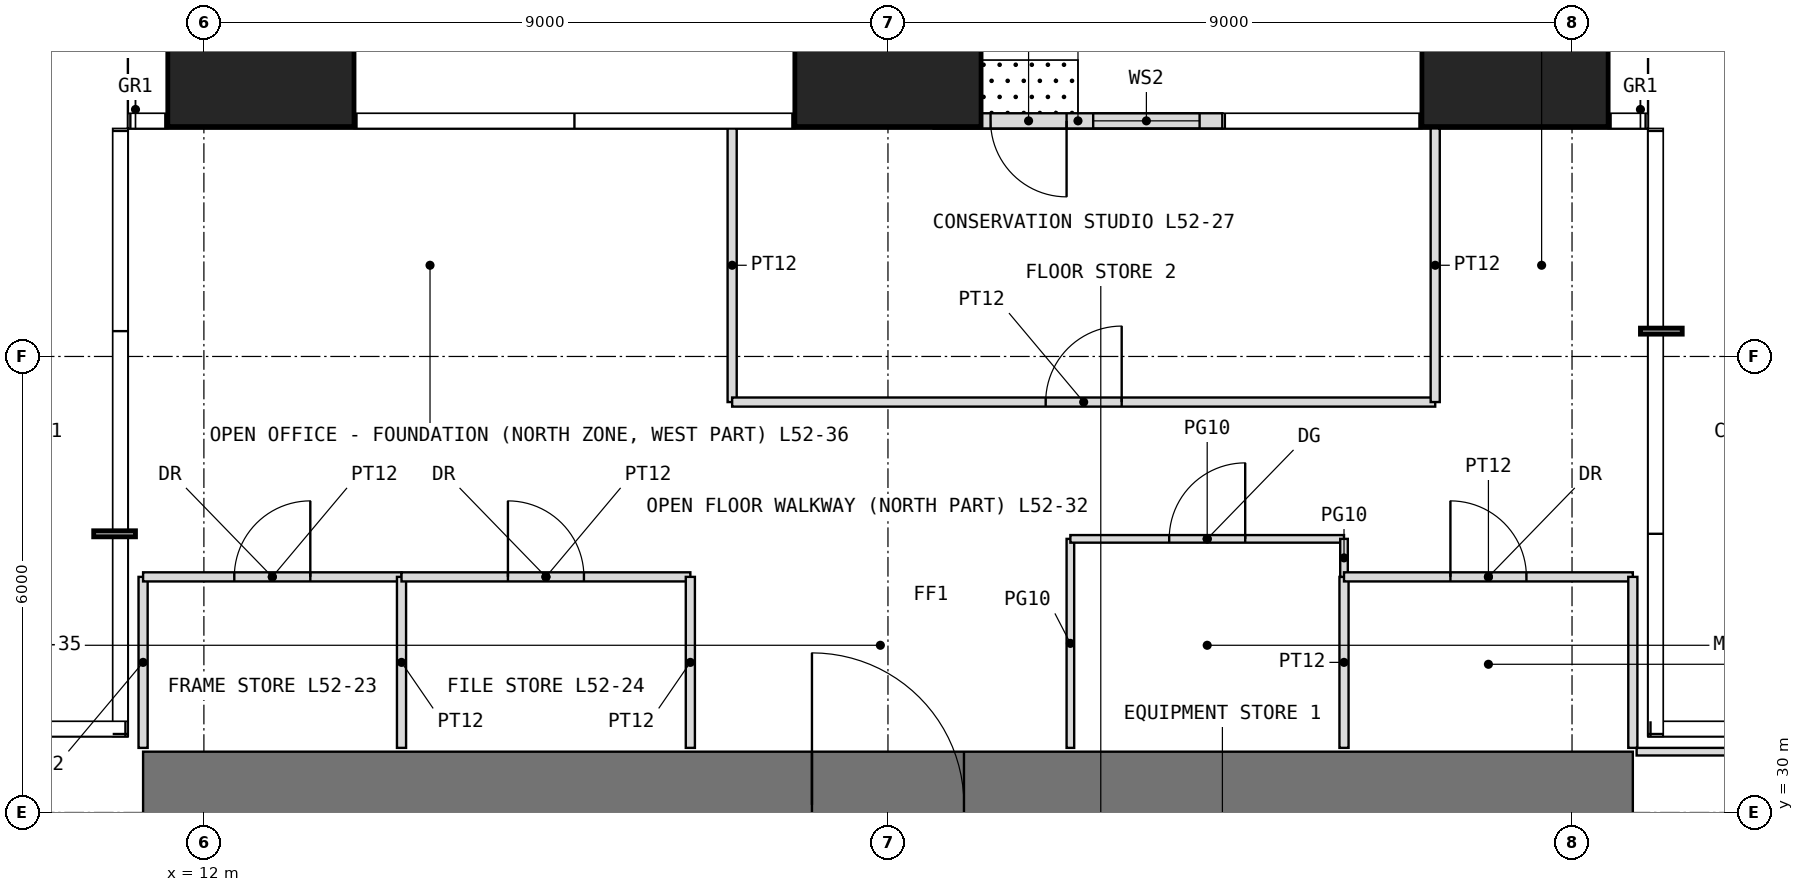
"""IFC4 building model, lengths in metres.
Left out: names, types, materials, properties, quantities, classifications, styles, units other than length and angle.
Written with IfcOpenShell. Run it as: python <this file> out.ifc"""

import sys

from ifc_helpers import new_model, si_unit, direction, frame, frame_2d, origin, origin_2d, place, context, subcontext, project, spatial, rectangle, extrude, element, fill, save


model = new_model("IFC4")
c1 = context("Model", 3, precision=1e-05, world=origin(), true_north=direction((0.0, 1.0)))
c2 = subcontext(c1, "Body", "Model", "MODEL_VIEW")
j1 = project(units=[si_unit("LENGTHUNIT", "METRE"), si_unit("PLANEANGLEUNIT", "RADIAN")], contexts=[c1])
p1 = place(None, origin())
s1 = spatial("IfcSite", under=j1, at=p1, CompositionType="ELEMENT")
p2 = place(p1, origin())
s2 = spatial("IfcBuilding", under=s1, at=p2, CompositionType="ELEMENT")
p3 = place(p2, frame((0.0, 0.0, 218.5)))
s3 = spatial("IfcBuildingStorey", under=s2, at=p3, CompositionType="ELEMENT", Elevation=218.5)
for number, where, z_axis, x_axis in (
    (1, (12.75, 40.25, 0.0), (0.0, 0.0, 1.0), (1.0, 0.0, 0.0)),
    (2, (21.0, 40.25, 0.0), (0.0, 0.0, 1.0), (1.0, 0.0, 0.0)),
    (3, (29.25, 40.25, 0.0), (0.0, 0.0, 1.0), (1.0, 0.0, 0.0)),
):
    element("IfcColumn", number, at=place(p3, frame(where, z_axis=z_axis, x_axis=x_axis)), inside=s3, PredefinedType="COLUMN", context=c2, shape_type="SweptSolid", body=[
        extrude(rectangle(XDim=2.45, YDim=2.45, at=origin_2d()), origin(), (0.0, 0.0, 1.0), 4.0),
    ])
p4 = place(p3, frame((25.4, 39.1, 0.0), z_axis=(0.0, 0.0, 1.0), x_axis=(-1.0, 0.0, 0.0)))
e4 = element("IfcWall", 4, at=p4, inside=s3, PredefinedType="USERDEFINED", context=c2, shape_type="SweptSolid", body=[
    extrude(rectangle(XDim=3.8, YDim=0.2, at=frame_2d((1.9, 0.0))), origin(), (0.0, 0.0, 1.0), 3.75),
])
p5 = place(p4, frame((2.05, 0.0, 0.0)))
e5 = element("IfcOpeningElement", 5, at=p5, cuts=e4, PredefinedType="OPENING", context=c2, shape_type="SweptSolid", body=[
    extrude(rectangle(XDim=1.0, YDim=2.4, at=frame_2d((0.5, 1.2))), frame((0.0, 0.11, 0.0), z_axis=(0.0, -1.0, 0.0), x_axis=(1.0, 0.0, 0.0)), (0.0, 0.0, 1.0), 0.22),
])
p6 = place(p4, frame((0.3, 0.0, 0.3)))
e6 = element("IfcOpeningElement", 6, at=p6, cuts=e4, PredefinedType="OPENING", context=c2, shape_type="SweptSolid", body=[
    extrude(rectangle(XDim=1.4, YDim=2.7, at=frame_2d((0.7, 1.35))), frame((0.0, 0.11, 0.0), z_axis=(0.0, -1.0, 0.0), x_axis=(1.0, 0.0, 0.0)), (0.0, 0.0, 1.0), 0.22),
])
p7 = place(p3, frame((11.2, 30.1, -0.05), z_axis=(0.0, 0.0, 1.0), x_axis=(1.0, 0.0, 0.0)))
e7 = element("IfcWall", 7, at=p7, inside=s3, PredefinedType="SHEAR", context=c2, shape_type="SweptSolid", body=[
    extrude(rectangle(XDim=19.6, YDim=1.4, at=frame_2d((9.8, 0.0))), origin(), (0.0, 0.0, 1.0), 4.0),
])
p8 = place(p7, frame((8.8, 0.0, 0.05)))
e8 = element("IfcOpeningElement", 8, at=p8, cuts=e7, PredefinedType="OPENING", context=c2, shape_type="SweptSolid", body=[
    extrude(rectangle(XDim=2.0, YDim=2.2, at=frame_2d((1.0, 1.1))), frame((0.0, 0.71, 0.0), z_axis=(0.0, -1.0, 0.0), x_axis=(1.0, 0.0, 0.0)), (0.0, 0.0, 1.0), 1.42),
])
p9 = place(p3, frame((11.2, 30.85, 0.0), z_axis=(0.0, 0.0, 1.0), x_axis=(0.0, 1.0, 0.0)))
e9 = element("IfcWall", 9, at=p9, inside=s3, PredefinedType="PARTITIONING", context=c2, shape_type="SweptSolid", body=[
    extrude(rectangle(XDim=2.25, YDim=0.12, at=frame_2d((1.125, 0.0))), origin(), (0.0, 0.0, 1.0), 3.75),
])
p10 = place(p3, frame((11.2, 33.1, 0.0), z_axis=(0.0, 0.0, 1.0), x_axis=(1.0, 0.0, 0.0)))
e10 = element("IfcWall", 10, at=p10, inside=s3, PredefinedType="PARTITIONING", context=c2, shape_type="SweptSolid", body=[
    extrude(rectangle(XDim=3.4, YDim=0.12, at=frame_2d((1.7, 0.0))), origin(), (0.0, 0.0, 1.0), 3.75),
])
p11 = place(p10, frame((1.2, 0.0, 0.0)))
e11 = element("IfcOpeningElement", 11, at=p11, cuts=e10, PredefinedType="OPENING", context=c2, shape_type="SweptSolid", body=[
    extrude(rectangle(XDim=1.0, YDim=2.2, at=frame_2d((0.5, 1.1))), frame((0.0, 0.07, 0.0), z_axis=(0.0, -1.0, 0.0), x_axis=(1.0, 0.0, 0.0)), (0.0, 0.0, 1.0), 0.14),
])
p12 = place(p3, frame((14.6, 30.85, 0.0), z_axis=(0.0, 0.0, 1.0), x_axis=(0.0, 1.0, 0.0)))
e12 = element("IfcWall", 12, at=p12, inside=s3, PredefinedType="PARTITIONING", context=c2, shape_type="SweptSolid", body=[
    extrude(rectangle(XDim=2.25, YDim=0.12, at=frame_2d((1.125, 0.0))), origin(), (0.0, 0.0, 1.0), 3.75),
])
p13 = place(p3, frame((14.6, 33.1, 0.0), z_axis=(0.0, 0.0, 1.0), x_axis=(1.0, 0.0, 0.0)))
e13 = element("IfcWall", 13, at=p13, inside=s3, PredefinedType="PARTITIONING", context=c2, shape_type="SweptSolid", body=[
    extrude(rectangle(XDim=3.8, YDim=0.12, at=frame_2d((1.9, 0.0))), origin(), (0.0, 0.0, 1.0), 3.75),
])
p14 = place(p13, frame((1.4, 0.0, 0.0)))
e14 = element("IfcOpeningElement", 14, at=p14, cuts=e13, PredefinedType="OPENING", context=c2, shape_type="SweptSolid", body=[
    extrude(rectangle(XDim=1.0, YDim=2.2, at=frame_2d((0.5, 1.1))), frame((0.0, 0.07, 0.0), z_axis=(0.0, -1.0, 0.0), x_axis=(1.0, 0.0, 0.0)), (0.0, 0.0, 1.0), 0.14),
])
p15 = place(p3, frame((18.4, 30.85, 0.0), z_axis=(0.0, 0.0, 1.0), x_axis=(0.0, 1.0, 0.0)))
e15 = element("IfcWall", 15, at=p15, inside=s3, PredefinedType="PARTITIONING", context=c2, shape_type="SweptSolid", body=[
    extrude(rectangle(XDim=2.25, YDim=0.12, at=frame_2d((1.125, 0.0))), origin(), (0.0, 0.0, 1.0), 3.75),
])
p16 = place(p3, frame((18.95, 35.4, 0.0), z_axis=(0.0, 0.0, 1.0), x_axis=(0.0, 1.0, 0.0)))
e16 = element("IfcWall", 16, at=p16, inside=s3, PredefinedType="PARTITIONING", context=c2, shape_type="SweptSolid", body=[
    extrude(rectangle(XDim=3.6, YDim=0.12, at=frame_2d((1.8, 0.0))), origin(), (0.0, 0.0, 1.0), 3.75),
])
p17 = place(p3, frame((18.95, 35.4, 0.0), z_axis=(0.0, 0.0, 1.0), x_axis=(1.0, 0.0, 0.0)))
e17 = element("IfcWall", 17, at=p17, inside=s3, PredefinedType="PARTITIONING", context=c2, shape_type="SweptSolid", body=[
    extrude(rectangle(XDim=9.25, YDim=0.12, at=frame_2d((4.625, 0.0))), origin(), (0.0, 0.0, 1.0), 3.75),
])
p18 = place(p17, frame((4.125, 0.0, 0.0)))
e18 = element("IfcOpeningElement", 18, at=p18, cuts=e17, PredefinedType="OPENING", context=c2, shape_type="SweptSolid", body=[
    extrude(rectangle(XDim=1.0, YDim=2.2, at=frame_2d((0.5, 1.1))), frame((0.0, 0.07, 0.0), z_axis=(0.0, -1.0, 0.0), x_axis=(1.0, 0.0, 0.0)), (0.0, 0.0, 1.0), 0.14),
])
p19 = place(p3, frame((23.4, 30.85, 0.0), z_axis=(0.0, 0.0, 1.0), x_axis=(0.0, 1.0, 0.0)))
e19 = element("IfcWall", 19, at=p19, inside=s3, PredefinedType="PARTITIONING", context=c2, shape_type="SweptSolid", body=[
    extrude(rectangle(XDim=2.75, YDim=0.1, at=frame_2d((1.375, 0.0))), origin(), (0.0, 0.0, 1.0), 3.75),
])
p20 = place(p3, frame((23.4, 33.6, 0.0), z_axis=(0.0, 0.0, 1.0), x_axis=(1.0, 0.0, 0.0)))
e20 = element("IfcWall", 20, at=p20, inside=s3, PredefinedType="PARTITIONING", context=c2, shape_type="SweptSolid", body=[
    extrude(rectangle(XDim=3.6, YDim=0.1, at=frame_2d((1.8, 0.0))), origin(), (0.0, 0.0, 1.0), 3.75),
])
p21 = place(p20, frame((1.3, 0.0, 0.0)))
e21 = element("IfcOpeningElement", 21, at=p21, cuts=e20, PredefinedType="OPENING", context=c2, shape_type="SweptSolid", body=[
    extrude(rectangle(XDim=1.0, YDim=2.4, at=frame_2d((0.5, 1.2))), frame((0.0, 0.06, 0.0), z_axis=(0.0, -1.0, 0.0), x_axis=(1.0, 0.0, 0.0)), (0.0, 0.0, 1.0), 0.12),
])
p22 = place(p3, frame((27.0, 30.85, 0.0), z_axis=(0.0, 0.0, 1.0), x_axis=(0.0, 1.0, 0.0)))
e22 = element("IfcWall", 22, at=p22, inside=s3, PredefinedType="PARTITIONING", context=c2, shape_type="SweptSolid", body=[
    extrude(rectangle(XDim=2.25, YDim=0.12, at=frame_2d((1.125, 0.0))), origin(), (0.0, 0.0, 1.0), 3.75),
])
p23 = place(p3, frame((27.0, 33.1, 0.0), z_axis=(0.0, 0.0, 1.0), x_axis=(0.0, 1.0, 0.0)))
e23 = element("IfcWall", 23, at=p23, inside=s3, PredefinedType="PARTITIONING", context=c2, shape_type="SweptSolid", body=[
    extrude(rectangle(XDim=0.5, YDim=0.1, at=frame_2d((0.25, 0.0))), origin(), (0.0, 0.0, 1.0), 3.75),
])
p24 = place(p3, frame((27.0, 33.1, 0.0), z_axis=(0.0, 0.0, 1.0), x_axis=(1.0, 0.0, 0.0)))
e24 = element("IfcWall", 24, at=p24, inside=s3, PredefinedType="PARTITIONING", context=c2, shape_type="SweptSolid", body=[
    extrude(rectangle(XDim=3.8, YDim=0.12, at=frame_2d((1.9, 0.0))), origin(), (0.0, 0.0, 1.0), 3.75),
])
p25 = place(p24, frame((1.4, 0.0, 0.0)))
e25 = element("IfcOpeningElement", 25, at=p25, cuts=e24, PredefinedType="OPENING", context=c2, shape_type="SweptSolid", body=[
    extrude(rectangle(XDim=1.0, YDim=2.2, at=frame_2d((0.5, 1.1))), frame((0.0, 0.07, 0.0), z_axis=(0.0, -1.0, 0.0), x_axis=(1.0, 0.0, 0.0)), (0.0, 0.0, 1.0), 0.14),
])
p26 = place(p3, frame((28.2, 35.4, 0.0), z_axis=(0.0, 0.0, 1.0), x_axis=(0.0, 1.0, 0.0)))
e26 = element("IfcWall", 26, at=p26, inside=s3, PredefinedType="PARTITIONING", context=c2, shape_type="SweptSolid", body=[
    extrude(rectangle(XDim=3.6, YDim=0.12, at=frame_2d((1.8, 0.0))), origin(), (0.0, 0.0, 1.0), 3.75),
])
p27 = place(p3, frame((30.8, 30.85, 0.0), z_axis=(0.0, 0.0, 1.0), x_axis=(0.0, 1.0, 0.0)))
e27 = element("IfcWall", 27, at=p27, inside=s3, PredefinedType="PARTITIONING", context=c2, shape_type="SweptSolid", body=[
    extrude(rectangle(XDim=2.25, YDim=0.12, at=frame_2d((1.125, 0.0))), origin(), (0.0, 0.0, 1.0), 3.75),
])
p28 = place(p3, frame((30.85, 30.8, 0.0), z_axis=(0.0, 0.0, 1.0), x_axis=(1.0, 0.0, 0.0)))
e28 = element("IfcWall", 28, at=p28, inside=s3, PredefinedType="PARTITIONING", context=c2, shape_type="SweptSolid", body=[
    extrude(rectangle(XDim=4.95, YDim=0.1, at=frame_2d((2.475, 0.0))), origin(), (0.0, 0.0, 1.0), 3.75),
])
p29 = place(p5, origin())
e29 = element("IfcDoor", 29, at=p29, inside=s3, OperationType="SINGLE_SWING_LEFT", PredefinedType="DOOR", context=c2, shape_type="SweptSolid", body=[
    extrude(rectangle(XDim=1.0, YDim=2.4, at=frame_2d((0.5, 1.2))), frame((0.0, 0.025, 0.0), z_axis=(0.0, -1.0, 0.0), x_axis=(1.0, 0.0, 0.0)), (0.0, 0.0, 1.0), 0.05),
])
fill(e5, e29)
p30 = place(p6, origin())
e30 = element("IfcWindow", 30, at=p30, inside=s3, PartitioningType="SINGLE_PANEL", PredefinedType="WINDOW", context=c2, shape_type="SweptSolid", body=[
    extrude(rectangle(XDim=1.4, YDim=2.7, at=frame_2d((0.7, 1.35))), frame((0.0, 0.03, 0.0), z_axis=(0.0, -1.0, 0.0), x_axis=(1.0, 0.0, 0.0)), (0.0, 0.0, 1.0), 0.06),
])
fill(e6, e30)
p31 = place(p8, origin())
e31 = element("IfcDoor", 31, at=p31, inside=s3, OperationType="DOUBLE_DOOR_SINGLE_SWING", PredefinedType="DOOR", context=c2, shape_type="SweptSolid", body=[
    extrude(rectangle(XDim=2.0, YDim=2.2, at=frame_2d((1.0, 1.1))), frame((0.0, 0.025, 0.0), z_axis=(0.0, -1.0, 0.0), x_axis=(1.0, 0.0, 0.0)), (0.0, 0.0, 1.0), 0.05),
])
fill(e8, e31)
p32 = place(p11, origin())
e32 = element("IfcDoor", 32, at=p32, inside=s3, OperationType="SINGLE_SWING_RIGHT", PredefinedType="DOOR", context=c2, shape_type="SweptSolid", body=[
    extrude(rectangle(XDim=1.0, YDim=2.2, at=frame_2d((0.5, 1.1))), frame((0.0, 0.025, 0.0), z_axis=(0.0, -1.0, 0.0), x_axis=(1.0, 0.0, 0.0)), (0.0, 0.0, 1.0), 0.05),
])
fill(e11, e32)
p33 = place(p14, origin())
e33 = element("IfcDoor", 33, at=p33, inside=s3, OperationType="SINGLE_SWING_LEFT", PredefinedType="DOOR", context=c2, shape_type="SweptSolid", body=[
    extrude(rectangle(XDim=1.0, YDim=2.2, at=frame_2d((0.5, 1.1))), frame((0.0, 0.025, 0.0), z_axis=(0.0, -1.0, 0.0), x_axis=(1.0, 0.0, 0.0)), (0.0, 0.0, 1.0), 0.05),
])
fill(e14, e33)
p34 = place(p21, origin())
e34 = element("IfcDoor", 34, at=p34, inside=s3, OperationType="SINGLE_SWING_RIGHT", PredefinedType="DOOR", context=c2, shape_type="SweptSolid", body=[
    extrude(rectangle(XDim=1.0, YDim=2.4, at=frame_2d((0.5, 1.2))), frame((0.0, 0.025, 0.0), z_axis=(0.0, -1.0, 0.0), x_axis=(1.0, 0.0, 0.0)), (0.0, 0.0, 1.0), 0.05),
])
fill(e21, e34)
p35 = place(p25, origin())
e35 = element("IfcDoor", 35, at=p35, inside=s3, OperationType="SINGLE_SWING_LEFT", PredefinedType="DOOR", context=c2, shape_type="SweptSolid", body=[
    extrude(rectangle(XDim=1.0, YDim=2.2, at=frame_2d((0.5, 1.1))), frame((0.0, 0.025, 0.0), z_axis=(0.0, -1.0, 0.0), x_axis=(1.0, 0.0, 0.0)), (0.0, 0.0, 1.0), 0.05),
])
fill(e25, e35)
p36 = place(p18, origin())
e36 = element("IfcDoor", 36, at=p36, inside=s3, OperationType="SINGLE_SWING_RIGHT", PredefinedType="DOOR", context=c2, shape_type="SweptSolid", body=[
    extrude(rectangle(XDim=1.0, YDim=2.2, at=frame_2d((0.5, 1.1))), frame((0.0, 0.025, 0.0), z_axis=(0.0, -1.0, 0.0), x_axis=(1.0, 0.0, 0.0)), (0.0, 0.0, 1.0), 0.05),
])
fill(e18, e36)
save(model, sys.argv[1])
